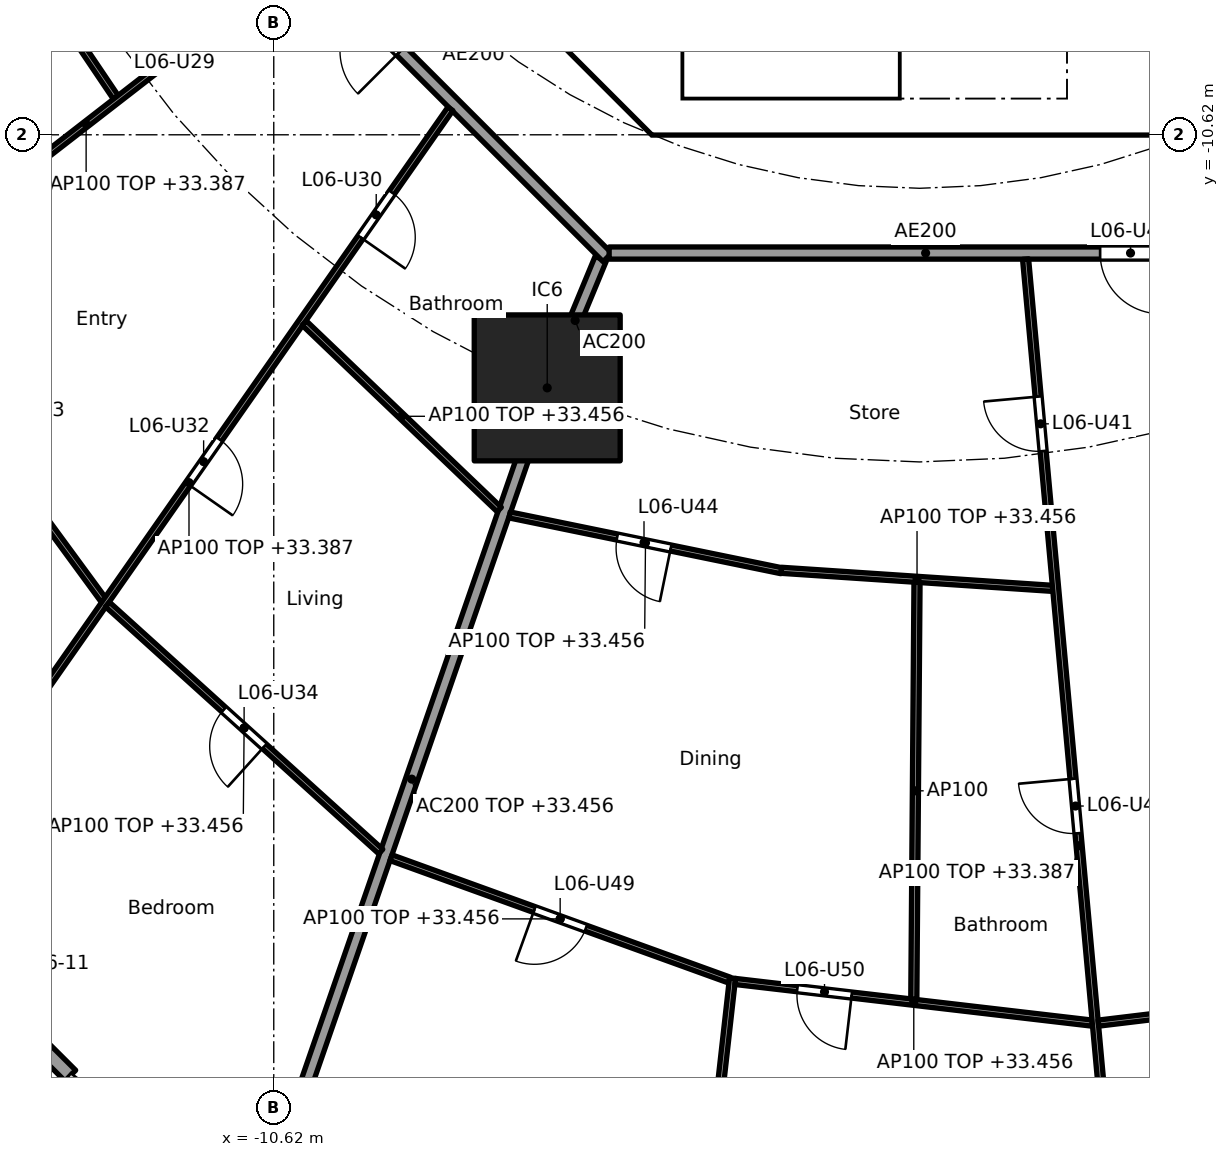
"""IFC4 building model, lengths in metres.
Left out: names, types, materials, properties, quantities, classifications, styles, units other than length and angle.
Written with IfcOpenShell. Run it as: python <this file> out.ifc"""

import sys

from ifc_helpers import new_model, si_unit, direction, frame, frame_2d, origin, origin_2d, place, context, subcontext, project, spatial, polyline, rectangle, outline, extrude, element, fill, save


model = new_model("IFC4")
c1 = context("Model", 3, precision=1e-05, world=origin(), true_north=direction((0.0, 1.0)))
c2 = subcontext(c1, "Body", "Model", "MODEL_VIEW")
j1 = project(units=[si_unit("LENGTHUNIT", "METRE"), si_unit("PLANEANGLEUNIT", "RADIAN")], contexts=[c1])
p1 = place(None, origin())
s1 = spatial("IfcSite", under=j1, at=p1, CompositionType="ELEMENT")
p2 = place(p1, origin())
s2 = spatial("IfcBuilding", under=s1, at=p2, CompositionType="ELEMENT")
p3 = place(p2, frame((0.0, 0.0, 30.7)))
s3 = spatial("IfcBuildingStorey", under=s2, at=p3, CompositionType="ELEMENT", Elevation=30.7)
p4 = place(p3, frame((-6.123, -14.782, 0.0), z_axis=(0.0, 0.0, 1.0), x_axis=(1.0, 0.0, 0.0)))
e1 = element("IfcColumn", 1, at=p4, inside=s3, PredefinedType="COLUMN", context=c2, shape_type="SweptSolid", body=[
    extrude(rectangle(XDim=2.4, YDim=2.4, at=origin_2d()), origin(), (0.0, 0.0, 1.0), 3.7),
])
p5 = place(p3, frame((-13.966, -26.092, 0.0), z_axis=(0.0, 0.0, 1.0), x_axis=(-0.707803094595, 0.706409781417, 0.0)))
e2 = element("IfcWall", 2, at=p5, inside=s3, PredefinedType="SOLIDWALL", context=c2, shape_type="SweptSolid", body=[
    extrude(rectangle(XDim=3.329, YDim=0.25, at=frame_2d((1.665, 0.0))), origin(), (0.0, 0.0, 1.0), 3.44),
])
p6 = place(p5, frame((0.615, 0.0, 0.0)))
e3 = element("IfcOpeningElement", 3, at=p6, cuts=e2, PredefinedType="OPENING", context=c2, shape_type="SweptSolid", body=[
    extrude(rectangle(XDim=2.1, YDim=2.4, at=frame_2d((1.05, 1.2))), frame((0.0, 0.135, 0.0), z_axis=(0.0, -1.0, 0.0), x_axis=(1.0, 0.0, 0.0)), (0.0, 0.0, 1.0), 0.27),
])
p7 = place(p3, frame((-9.988, -4.613, 0.0), z_axis=(0.0, 0.0, 1.0), x_axis=(0.707106781187, -0.707106781187, 0.0)))
e4 = element("IfcWall", 4, at=p7, inside=s3, PredefinedType="SHEAR", context=c2, shape_type="SweptSolid", body=[
    extrude(rectangle(XDim=7.602, YDim=0.6, at=frame_2d((3.801, 0.0))), origin(), (0.0, 0.0, 1.0), 3.44),
])
p8 = place(p7, frame((6.151, 0.0, 0.0)))
e5 = element("IfcOpeningElement", 5, at=p8, cuts=e4, PredefinedType="OPENING", context=c2, shape_type="SweptSolid", body=[
    extrude(rectangle(XDim=1.1, YDim=2.1, at=frame_2d((0.55, 1.05))), frame((0.0, 0.31, 0.0), z_axis=(0.0, -1.0, 0.0), x_axis=(1.0, 0.0, 0.0)), (0.0, 0.0, 1.0), 0.62),
])
p9 = place(p3, origin())
e6 = element("IfcWall", 6, at=p9, inside=s3, PredefinedType="SHEAR", context=c2, shape_type="SweptSolid", body=[
    extrude(outline(polyline([(-4.152, -10.025), (4.152, -10.025), (4.401, -9.776), (4.825, -10.2), (4.401, -10.625), (-4.401, -10.625), (-4.825, -10.2), (-4.401, -9.776), (-4.152, -10.025)])), origin(), (0.0, 0.0, 1.0), 3.44),
])
p10 = place(p3, origin())
e7 = element("IfcWall", 7, at=p10, inside=s3, PredefinedType="SOLIDWALL", context=c2, shape_type="SweptSolid", body=[
    extrude(outline(polyline([(-3.9, -10.025), (-4.1, -10.025), (-4.1, -7.025), (-3.9, -7.025), (-3.9, -10.025)])), origin(), (0.0, 0.0, 1.0), 3.44),
])
p11 = place(p3, frame((-5.243, -12.657, 0.0), z_axis=(0.0, 0.0, 1.0), x_axis=(-0.382668627144, -0.923885664896, 0.0)))
e8 = element("IfcWall", 8, at=p11, inside=s3, PredefinedType="PARTITIONING", context=c2, shape_type="SweptSolid", body=[
    extrude(rectangle(XDim=2.2, YDim=0.2, at=frame_2d((1.1, 0.0))), origin(), (0.0, 0.0, 1.0), 3.44),
])
p12 = place(p3, frame((-6.139, -14.829, 0.0), z_axis=(0.0, 0.0, 1.0), x_axis=(-0.327178799566, -0.944962450637, 0.0)))
e9 = element("IfcWall", 9, at=p12, inside=s3, PredefinedType="PARTITIONING", context=c2, shape_type="SweptSolid", body=[
    extrude(rectangle(XDim=13.517, YDim=0.2, at=frame_2d((6.759, 0.0))), origin(), (0.0, 0.0, 1.0), 2.756),
])
p13 = place(p3, frame((-12.635, -5.134, 0.0), z_axis=(0.0, 0.0, 1.0), x_axis=(0.707106781187, -0.707106781187, 0.0)))
e10 = element("IfcWall", 10, at=p13, inside=s3, PredefinedType="PARTITIONING", context=c2, shape_type="SweptSolid", body=[
    extrude(rectangle(XDim=10.609, YDim=0.2, at=frame_2d((5.305, 0.0))), origin(), (0.0, 0.0, 1.0), 3.44),
])
p14 = place(p13, frame((4.804, 0.0, 0.0)))
e11 = element("IfcOpeningElement", 11, at=p14, cuts=e10, PredefinedType="OPENING", context=c2, shape_type="SweptSolid", body=[
    extrude(rectangle(XDim=1.0, YDim=2.1, at=frame_2d((0.5, 1.05))), frame((0.0, 0.11, 0.0), z_axis=(0.0, -1.0, 0.0), x_axis=(1.0, 0.0, 0.0)), (0.0, 0.0, 1.0), 0.22),
])
p15 = place(p3, frame((-5.104, -12.565, 0.0), z_axis=(0.0, 0.0, 1.0), x_axis=(1.0, 0.0, 0.0)))
e12 = element("IfcWall", 12, at=p15, inside=s3, PredefinedType="PARTITIONING", context=c2, shape_type="SweptSolid", body=[
    extrude(rectangle(XDim=10.409, YDim=0.2, at=frame_2d((5.205, 0.0))), origin(), (0.0, 0.0, 1.0), 3.44),
])
p16 = place(p15, frame((8.074, 0.0, 0.0)))
e13 = element("IfcOpeningElement", 13, at=p16, cuts=e12, PredefinedType="OPENING", context=c2, shape_type="SweptSolid", body=[
    extrude(rectangle(XDim=1.0, YDim=2.1, at=frame_2d((0.5, 1.05))), frame((0.0, 0.11, 0.0), z_axis=(0.0, -1.0, 0.0), x_axis=(1.0, 0.0, 0.0)), (0.0, 0.0, 1.0), 0.22),
])
p17 = place(p3, frame((-15.655, -6.391, 0.0), z_axis=(0.0, 0.0, 1.0), x_axis=(0.559126445155, -0.82908239538, 0.0)))
e14 = element("IfcWall", 14, at=p17, inside=s3, PredefinedType="PARTITIONING", context=c2, shape_type="SweptSolid", body=[
    extrude(rectangle(XDim=4.358, YDim=0.1, at=frame_2d((2.179, 0.0))), origin(), (0.0, 0.0, 1.0), 3.44),
])
p18 = place(p3, frame((-10.19, -7.719, 0.0), z_axis=(0.0, 0.0, 1.0), x_axis=(-0.790264549439, -0.612765813259, 0.0)))
e15 = element("IfcWall", 15, at=p18, inside=s3, PredefinedType="PARTITIONING", context=c2, shape_type="SweptSolid", body=[
    extrude(rectangle(XDim=8.896, YDim=0.1, at=frame_2d((4.448, 0.0))), origin(), (0.0, 0.0, 1.0), 2.687),
])
p19 = place(p18, frame((1.448, 0.0, 0.0)))
e16 = element("IfcOpeningElement", 16, at=p19, cuts=e15, PredefinedType="OPENING", context=c2, shape_type="SweptSolid", body=[
    extrude(rectangle(XDim=0.9, YDim=2.1, at=frame_2d((0.45, 1.05))), frame((0.0, 0.06, 0.0), z_axis=(0.0, -1.0, 0.0), x_axis=(1.0, 0.0, 0.0)), (0.0, 0.0, 1.0), 0.12),
])
p20 = place(p18, frame((5.871, 0.0, 0.0)))
e17 = element("IfcOpeningElement", 17, at=p20, cuts=e15, PredefinedType="OPENING", context=c2, shape_type="SweptSolid", body=[
    extrude(rectangle(XDim=0.9, YDim=2.1, at=frame_2d((0.45, 1.05))), frame((0.0, 0.06, 0.0), z_axis=(0.0, -1.0, 0.0), x_axis=(1.0, 0.0, 0.0)), (0.0, 0.0, 1.0), 0.12),
])
p21 = place(p3, frame((-17.152, -13.18, 0.0), z_axis=(0.0, 0.0, 1.0), x_axis=(0.591222750954, -0.806508312886, 0.0)))
e18 = element("IfcWall", 18, at=p21, inside=s3, PredefinedType="PARTITIONING", context=c2, shape_type="SweptSolid", body=[
    extrude(rectangle(XDim=6.31, YDim=0.1, at=frame_2d((3.155, 0.0))), origin(), (0.0, 0.0, 1.0), 2.756),
])
p22 = place(p21, frame((2.705, 0.0, 0.0)))
e19 = element("IfcOpeningElement", 19, at=p22, cuts=e18, PredefinedType="OPENING", context=c2, shape_type="SweptSolid", body=[
    extrude(rectangle(XDim=0.9, YDim=2.1, at=frame_2d((0.45, 1.05))), frame((0.0, 0.06, 0.0), z_axis=(0.0, -1.0, 0.0), x_axis=(1.0, 0.0, 0.0)), (0.0, 0.0, 1.0), 0.12),
])
p23 = place(p3, frame((-7.715, -10.193, 0.0), z_axis=(0.0, 0.0, 1.0), x_axis=(-0.573126964124, -0.819466584428, 0.0)))
e20 = element("IfcWall", 20, at=p23, inside=s3, PredefinedType="PARTITIONING", context=c2, shape_type="SweptSolid", body=[
    extrude(rectangle(XDim=15.001, YDim=0.1, at=frame_2d((7.5, 0.0))), origin(), (0.0, 0.0, 1.0), 2.687),
])
p24 = place(p23, frame((1.678, 0.0, 0.0)))
e21 = element("IfcOpeningElement", 21, at=p24, cuts=e20, PredefinedType="OPENING", context=c2, shape_type="SweptSolid", body=[
    extrude(rectangle(XDim=0.9, YDim=2.1, at=frame_2d((0.45, 1.05))), frame((0.0, 0.06, 0.0), z_axis=(0.0, -1.0, 0.0), x_axis=(1.0, 0.0, 0.0)), (0.0, 0.0, 1.0), 0.12),
])
p25 = place(p23, frame((6.631, 0.0, 0.0)))
e22 = element("IfcOpeningElement", 22, at=p25, cuts=e20, PredefinedType="OPENING", context=c2, shape_type="SweptSolid", body=[
    extrude(rectangle(XDim=0.9, YDim=2.1, at=frame_2d((0.45, 1.05))), frame((0.0, 0.06, 0.0), z_axis=(0.0, -1.0, 0.0), x_axis=(1.0, 0.0, 0.0)), (0.0, 0.0, 1.0), 0.12),
])
p26 = place(p3, frame((-10.119, -13.716, 0.0), z_axis=(0.0, 0.0, 1.0), x_axis=(0.722775679202, -0.691082713975, 0.0)))
e23 = element("IfcWall", 23, at=p26, inside=s3, PredefinedType="PARTITIONING", context=c2, shape_type="SweptSolid", body=[
    extrude(rectangle(XDim=4.437, YDim=0.1, at=frame_2d((2.219, 0.0))), origin(), (0.0, 0.0, 1.0), 2.756),
])
p27 = place(p3, frame((-13.355, -18.343, 0.0), z_axis=(0.0, 0.0, 1.0), x_axis=(0.741713303551, -0.670717060567, 0.0)))
e24 = element("IfcWall", 24, at=p27, inside=s3, PredefinedType="PARTITIONING", context=c2, shape_type="SweptSolid", body=[
    extrude(rectangle(XDim=6.059, YDim=0.1, at=frame_2d((3.03, 0.0))), origin(), (0.0, 0.0, 1.0), 2.756),
])
p28 = place(p27, frame((2.58, 0.0, 0.0)))
e25 = element("IfcOpeningElement", 25, at=p28, cuts=e24, PredefinedType="OPENING", context=c2, shape_type="SweptSolid", body=[
    extrude(rectangle(XDim=0.9, YDim=2.1, at=frame_2d((0.45, 1.05))), frame((0.0, 0.06, 0.0), z_axis=(0.0, -1.0, 0.0), x_axis=(1.0, 0.0, 0.0)), (0.0, 0.0, 1.0), 0.12),
])
p29 = place(p3, frame((-6.741, -16.872, 0.0), z_axis=(0.0, 0.0, 1.0), x_axis=(0.979595137747, -0.200981009307, 0.0)))
e26 = element("IfcWall", 26, at=p29, inside=s3, PredefinedType="PARTITIONING", context=c2, shape_type="SweptSolid", body=[
    extrude(rectangle(XDim=4.562, YDim=0.1, at=frame_2d((2.281, 0.0))), origin(), (0.0, 0.0, 1.0), 2.756),
])
p30 = place(p29, frame((1.806, 0.0, 0.0)))
e27 = element("IfcOpeningElement", 27, at=p30, cuts=e26, PredefinedType="OPENING", context=c2, shape_type="SweptSolid", body=[
    extrude(rectangle(XDim=0.9, YDim=2.1, at=frame_2d((0.45, 1.05))), frame((0.0, 0.06, 0.0), z_axis=(0.0, -1.0, 0.0), x_axis=(1.0, 0.0, 0.0)), (0.0, 0.0, 1.0), 0.12),
])
p31 = place(p3, frame((-8.692, -22.508, 0.0), z_axis=(0.0, 0.0, 1.0), x_axis=(0.940401494588, -0.340066212636, 0.0)))
e28 = element("IfcWall", 28, at=p31, inside=s3, PredefinedType="PARTITIONING", context=c2, shape_type="SweptSolid", body=[
    extrude(rectangle(XDim=5.917, YDim=0.1, at=frame_2d((2.958, 0.0))), origin(), (0.0, 0.0, 1.0), 2.756),
])
p32 = place(p31, frame((2.509, 0.0, 0.0)))
e29 = element("IfcOpeningElement", 29, at=p32, cuts=e28, PredefinedType="OPENING", context=c2, shape_type="SweptSolid", body=[
    extrude(rectangle(XDim=0.9, YDim=2.1, at=frame_2d((0.45, 1.05))), frame((0.0, 0.06, 0.0), z_axis=(0.0, -1.0, 0.0), x_axis=(1.0, 0.0, 0.0)), (0.0, 0.0, 1.0), 0.12),
])
p33 = place(p3, frame((-2.271, -17.782, 0.0), z_axis=(0.0, 0.0, 1.0), x_axis=(0.997791437766, -0.066424744789, 0.0)))
e30 = element("IfcWall", 30, at=p33, inside=s3, PredefinedType="PARTITIONING", context=c2, shape_type="SweptSolid", body=[
    extrude(rectangle(XDim=4.469, YDim=0.1, at=frame_2d((2.235, 0.0))), origin(), (0.0, 0.0, 1.0), 2.756),
])
p34 = place(p3, frame((-3.075, -24.488, 0.0), z_axis=(0.0, 0.0, 1.0), x_axis=(-0.111705235978, -0.993741384997, 0.0)))
e31 = element("IfcWall", 31, at=p34, inside=s3, PredefinedType="PARTITIONING", context=c2, shape_type="SweptSolid", body=[
    extrude(rectangle(XDim=6.395, YDim=0.1, at=frame_2d((3.198, 0.0))), origin(), (0.0, 0.0, 1.0), 2.756),
])
p35 = place(p3, frame((-3.031, -24.543, 0.0), z_axis=(0.0, 0.0, 1.0), x_axis=(0.993255612046, -0.115945198862, 0.0)))
e32 = element("IfcWall", 32, at=p35, inside=s3, PredefinedType="PARTITIONING", context=c2, shape_type="SweptSolid", body=[
    extrude(rectangle(XDim=5.913, YDim=0.1, at=frame_2d((2.956, 0.0))), origin(), (0.0, 0.0, 1.0), 2.756),
])
p36 = place(p35, frame((1.028, 0.0, 0.0)))
e33 = element("IfcOpeningElement", 33, at=p36, cuts=e32, PredefinedType="OPENING", context=c2, shape_type="SweptSolid", body=[
    extrude(rectangle(XDim=0.9, YDim=2.1, at=frame_2d((0.45, 1.05))), frame((0.0, 0.06, 0.0), z_axis=(0.0, -1.0, 0.0), x_axis=(1.0, 0.0, 0.0)), (0.0, 0.0, 1.0), 0.12),
])
p37 = place(p3, frame((-0.042, -17.98, 0.0), z_axis=(0.0, 0.0, 1.0), x_axis=(-0.007692080119, -0.999970415514, 0.0)))
e34 = element("IfcWall", 34, at=p37, inside=s3, PredefinedType="PARTITIONING", context=c2, shape_type="SweptSolid", body=[
    extrude(rectangle(XDim=6.856, YDim=0.1, at=frame_2d((3.428, 0.0))), origin(), (0.0, 0.0, 1.0), 3.44),
])
p38 = place(p3, frame((1.744, -12.664, 0.0), z_axis=(0.0, 0.0, 1.0), x_axis=(0.090893639596, -0.995860605849, 0.0)))
e35 = element("IfcWall", 35, at=p38, inside=s3, PredefinedType="PARTITIONING", context=c2, shape_type="SweptSolid", body=[
    extrude(rectangle(XDim=19.374, YDim=0.1, at=frame_2d((9.687, 0.0))), origin(), (0.0, 0.0, 1.0), 2.687),
])
p39 = place(p38, frame((2.27, 0.0, 0.0)))
e36 = element("IfcOpeningElement", 36, at=p39, cuts=e35, PredefinedType="OPENING", context=c2, shape_type="SweptSolid", body=[
    extrude(rectangle(XDim=0.9, YDim=2.1, at=frame_2d((0.45, 1.05))), frame((0.0, 0.06, 0.0), z_axis=(0.0, -1.0, 0.0), x_axis=(1.0, 0.0, 0.0)), (0.0, 0.0, 1.0), 0.12),
])
p40 = place(p38, frame((8.582, 0.0, 0.0)))
e37 = element("IfcOpeningElement", 37, at=p40, cuts=e35, PredefinedType="OPENING", context=c2, shape_type="SweptSolid", body=[
    extrude(rectangle(XDim=0.9, YDim=2.1, at=frame_2d((0.45, 1.05))), frame((0.0, 0.06, 0.0), z_axis=(0.0, -1.0, 0.0), x_axis=(1.0, 0.0, 0.0)), (0.0, 0.0, 1.0), 0.12),
])
p41 = place(p38, frame((15.548, 0.0, 0.0)))
e38 = element("IfcOpeningElement", 38, at=p41, cuts=e35, PredefinedType="OPENING", context=c2, shape_type="SweptSolid", body=[
    extrude(rectangle(XDim=0.9, YDim=2.1, at=frame_2d((0.45, 1.05))), frame((0.0, 0.06, 0.0), z_axis=(0.0, -1.0, 0.0), x_axis=(1.0, 0.0, 0.0)), (0.0, 0.0, 1.0), 0.12),
])
p42 = place(p3, frame((2.941, -25.229, 0.0), z_axis=(0.0, 0.0, 1.0), x_axis=(0.992836798252, 0.119478416615, 0.0)))
e39 = element("IfcWall", 39, at=p42, inside=s3, PredefinedType="PARTITIONING", context=c2, shape_type="SweptSolid", body=[
    extrude(rectangle(XDim=6.01, YDim=0.1, at=frame_2d((3.005, 0.0))), origin(), (0.0, 0.0, 1.0), 2.756),
])
p43 = place(p8, origin())
e40 = element("IfcDoor", 40, at=p43, inside=s3, OperationType="SINGLE_SWING_RIGHT", PredefinedType="DOOR", context=c2, shape_type="SweptSolid", body=[
    extrude(rectangle(XDim=1.1, YDim=2.1, at=frame_2d((0.55, 1.05))), frame((0.0, 0.025, 0.0), z_axis=(0.0, -1.0, 0.0), x_axis=(1.0, 0.0, 0.0)), (0.0, 0.0, 1.0), 0.05),
])
fill(e5, e40)
p44 = place(p24, origin())
e41 = element("IfcDoor", 41, at=p44, inside=s3, OperationType="SINGLE_SWING_RIGHT", PredefinedType="DOOR", context=c2, shape_type="SweptSolid", body=[
    extrude(rectangle(XDim=0.9, YDim=2.1, at=frame_2d((0.45, 1.05))), frame((0.0, 0.025, 0.0), z_axis=(0.0, -1.0, 0.0), x_axis=(1.0, 0.0, 0.0)), (0.0, 0.0, 1.0), 0.05),
])
fill(e21, e41)
p45 = place(p25, origin())
e42 = element("IfcDoor", 42, at=p45, inside=s3, OperationType="SINGLE_SWING_RIGHT", PredefinedType="DOOR", context=c2, shape_type="SweptSolid", body=[
    extrude(rectangle(XDim=0.9, YDim=2.1, at=frame_2d((0.45, 1.05))), frame((0.0, 0.025, 0.0), z_axis=(0.0, -1.0, 0.0), x_axis=(1.0, 0.0, 0.0)), (0.0, 0.0, 1.0), 0.05),
])
fill(e22, e42)
p46 = place(p28, frame((0.9, 0.0, 0.0), x_axis=(-1.0, 0.0, 0.0)))
e43 = element("IfcDoor", 43, at=p46, inside=s3, OperationType="SINGLE_SWING_LEFT", PredefinedType="DOOR", context=c2, shape_type="SweptSolid", body=[
    extrude(rectangle(XDim=0.9, YDim=2.1, at=frame_2d((0.45, 1.05))), frame((0.0, 0.025, 0.0), z_axis=(0.0, -1.0, 0.0), x_axis=(1.0, 0.0, 0.0)), (0.0, 0.0, 1.0), 0.05),
])
fill(e25, e43)
p47 = place(p16, frame((1.0, 0.0, 0.0), x_axis=(-1.0, 0.0, 0.0)))
e44 = element("IfcDoor", 44, at=p47, inside=s3, OperationType="SINGLE_SWING_LEFT", PredefinedType="DOOR", context=c2, shape_type="SweptSolid", body=[
    extrude(rectangle(XDim=1.0, YDim=2.1, at=frame_2d((0.5, 1.05))), frame((0.0, 0.025, 0.0), z_axis=(0.0, -1.0, 0.0), x_axis=(1.0, 0.0, 0.0)), (0.0, 0.0, 1.0), 0.05),
])
fill(e13, e44)
p48 = place(p39, frame((0.9, 0.0, 0.0), x_axis=(-1.0, 0.0, 0.0)))
e45 = element("IfcDoor", 45, at=p48, inside=s3, OperationType="SINGLE_SWING_RIGHT", PredefinedType="DOOR", context=c2, shape_type="SweptSolid", body=[
    extrude(rectangle(XDim=0.9, YDim=2.1, at=frame_2d((0.45, 1.05))), frame((0.0, 0.025, 0.0), z_axis=(0.0, -1.0, 0.0), x_axis=(1.0, 0.0, 0.0)), (0.0, 0.0, 1.0), 0.05),
])
fill(e36, e45)
p49 = place(p30, frame((0.9, 0.0, 0.0), x_axis=(-1.0, 0.0, 0.0)))
e46 = element("IfcDoor", 46, at=p49, inside=s3, OperationType="SINGLE_SWING_LEFT", PredefinedType="DOOR", context=c2, shape_type="SweptSolid", body=[
    extrude(rectangle(XDim=0.9, YDim=2.1, at=frame_2d((0.45, 1.05))), frame((0.0, 0.025, 0.0), z_axis=(0.0, -1.0, 0.0), x_axis=(1.0, 0.0, 0.0)), (0.0, 0.0, 1.0), 0.05),
])
fill(e27, e46)
p50 = place(p40, frame((0.9, 0.0, 0.0), x_axis=(-1.0, 0.0, 0.0)))
e47 = element("IfcDoor", 47, at=p50, inside=s3, OperationType="SINGLE_SWING_RIGHT", PredefinedType="DOOR", context=c2, shape_type="SweptSolid", body=[
    extrude(rectangle(XDim=0.9, YDim=2.1, at=frame_2d((0.45, 1.05))), frame((0.0, 0.025, 0.0), z_axis=(0.0, -1.0, 0.0), x_axis=(1.0, 0.0, 0.0)), (0.0, 0.0, 1.0), 0.05),
])
fill(e37, e47)
p51 = place(p32, frame((0.9, 0.0, 0.0), x_axis=(-1.0, 0.0, 0.0)))
e48 = element("IfcDoor", 48, at=p51, inside=s3, OperationType="SINGLE_SWING_RIGHT", PredefinedType="DOOR", context=c2, shape_type="SweptSolid", body=[
    extrude(rectangle(XDim=0.9, YDim=2.1, at=frame_2d((0.45, 1.05))), frame((0.0, 0.025, 0.0), z_axis=(0.0, -1.0, 0.0), x_axis=(1.0, 0.0, 0.0)), (0.0, 0.0, 1.0), 0.05),
])
fill(e29, e48)
p52 = place(p36, frame((0.9, 0.0, 0.0), x_axis=(-1.0, 0.0, 0.0)))
e49 = element("IfcDoor", 49, at=p52, inside=s3, OperationType="SINGLE_SWING_LEFT", PredefinedType="DOOR", context=c2, shape_type="SweptSolid", body=[
    extrude(rectangle(XDim=0.9, YDim=2.1, at=frame_2d((0.45, 1.05))), frame((0.0, 0.025, 0.0), z_axis=(0.0, -1.0, 0.0), x_axis=(1.0, 0.0, 0.0)), (0.0, 0.0, 1.0), 0.05),
])
fill(e33, e49)
save(model, sys.argv[1])
